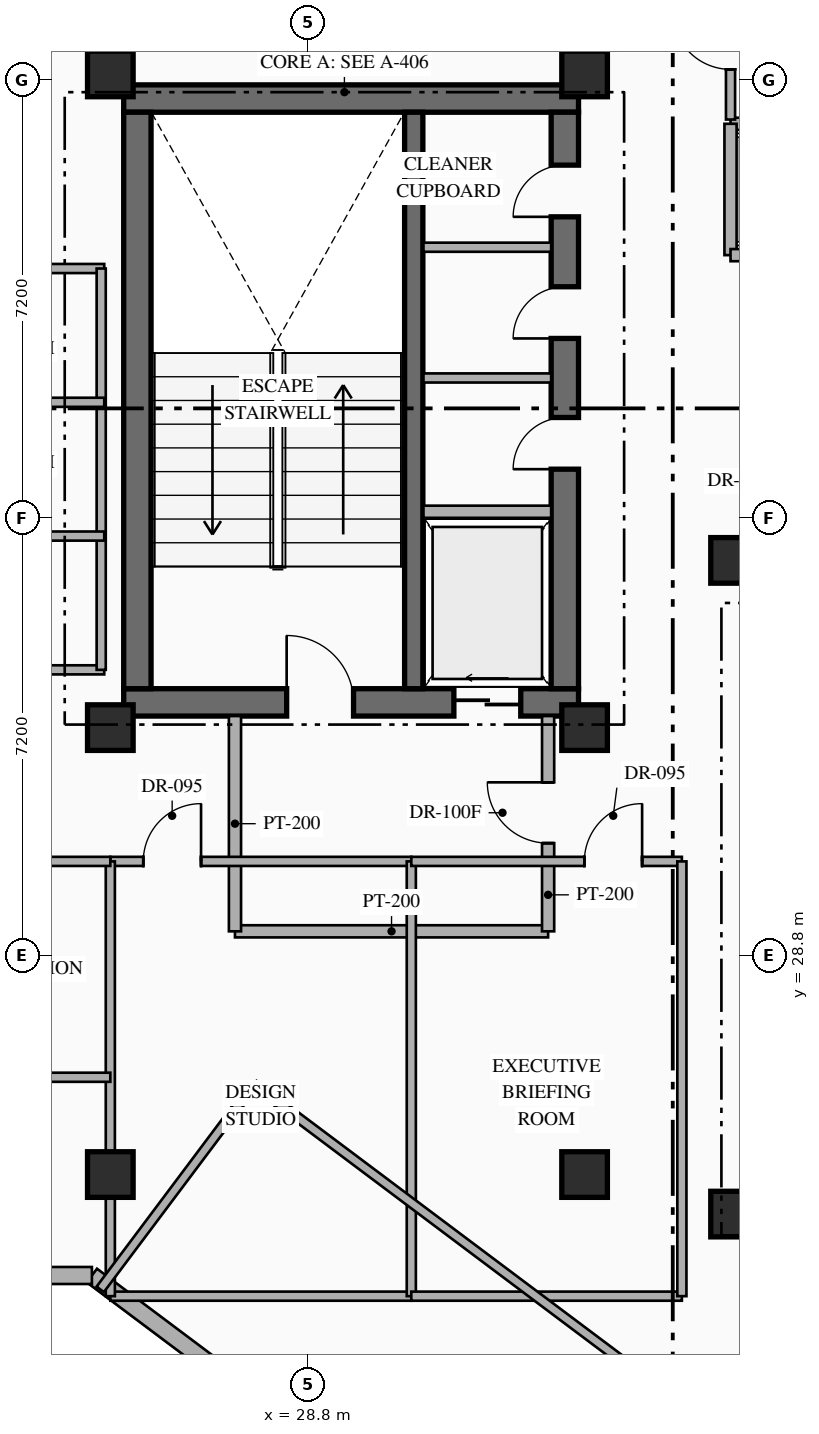
"""IFC4 building model, lengths in metres.
Left out: names, types, materials, properties, quantities, classifications, styles, units other than length and angle.
Written with IfcOpenShell. Run it as: python <this file> out.ifc"""

import sys

from ifc_helpers import new_model, si_unit, direction, frame, frame_2d, origin, origin_2d, place, context, subcontext, project, spatial, rectangle, hollow_rectangle, extrude, element, fill, save


model = new_model("IFC4")
c1 = context("Model", 3, precision=1e-05, world=origin(), true_north=direction((0.0, 1.0)))
c2 = subcontext(c1, "Body", "Model", "MODEL_VIEW")
j1 = project(units=[si_unit("LENGTHUNIT", "METRE"), si_unit("PLANEANGLEUNIT", "RADIAN")], contexts=[c1])
p1 = place(None, origin())
s1 = spatial("IfcSite", under=j1, at=p1, CompositionType="ELEMENT")
p2 = place(p1, origin())
s2 = spatial("IfcBuilding", under=s1, at=p2, CompositionType="ELEMENT")
p3 = place(p2, frame((0.0, 0.0, 195.15)))
s3 = spatial("IfcBuildingStorey", under=s2, at=p3, CompositionType="ELEMENT", Elevation=195.15)
p4 = place(p3, frame((25.77, 32.965, 0.0), z_axis=(0.0, 0.0, 1.0), x_axis=(1.0, 0.0, 0.0)))
e1 = element("IfcWall", 1, at=p4, inside=s3, PredefinedType="SHEAR", context=c2, shape_type="SweptSolid", body=[
    extrude(rectangle(XDim=7.48, YDim=0.45, at=frame_2d((3.74, 0.0))), origin(), (0.0, 0.0, 1.0), 3.6),
])
p5 = place(p4, frame((2.68, 0.0, 0.0)))
e2 = element("IfcOpeningElement", 2, at=p5, cuts=e1, PredefinedType="OPENING", context=c2, shape_type="SweptSolid", body=[
    extrude(rectangle(XDim=1.1, YDim=2.2, at=frame_2d((0.55, 1.1))), frame((0.0, 0.235, 0.0), z_axis=(0.0, -1.0, 0.0), x_axis=(1.0, 0.0, 0.0)), (0.0, 0.0, 1.0), 0.47),
])
p6 = place(p4, frame((5.43, 0.0, 0.0)))
e3 = element("IfcOpeningElement", 3, at=p6, cuts=e1, PredefinedType="OPENING", context=c2, shape_type="SweptSolid", body=[
    extrude(rectangle(XDim=1.1, YDim=2.15, at=frame_2d((0.55, 1.075))), frame((0.0, 0.235, 0.0), z_axis=(0.0, -1.0, 0.0), x_axis=(1.0, 0.0, 0.0)), (0.0, 0.0, 1.0), 0.47),
])
p7 = place(p3, frame((25.77, 42.895, 0.0), z_axis=(0.0, 0.0, 1.0), x_axis=(1.0, 0.0, 0.0)))
e4 = element("IfcWall", 4, at=p7, inside=s3, PredefinedType="SHEAR", context=c2, shape_type="SweptSolid", body=[
    extrude(rectangle(XDim=7.48, YDim=0.45, at=frame_2d((3.74, 0.0))), origin(), (0.0, 0.0, 1.0), 3.6),
])
p8 = place(p3, frame((25.995, 33.19, 0.0), z_axis=(0.0, 0.0, 1.0), x_axis=(0.0, 1.0, 0.0)))
e5 = element("IfcWall", 5, at=p8, inside=s3, PredefinedType="SHEAR", context=c2, shape_type="SweptSolid", body=[
    extrude(rectangle(XDim=9.48, YDim=0.45, at=frame_2d((4.74, 0.0))), origin(), (0.0, 0.0, 1.0), 3.6),
])
p9 = place(p3, frame((33.025, 33.19, 0.0), z_axis=(0.0, 0.0, 1.0), x_axis=(0.0, 1.0, 0.0)))
e6 = element("IfcWall", 6, at=p9, inside=s3, PredefinedType="SHEAR", context=c2, shape_type="SweptSolid", body=[
    extrude(rectangle(XDim=9.48, YDim=0.45, at=frame_2d((4.74, 0.0))), origin(), (0.0, 0.0, 1.0), 3.6),
])
p10 = place(p9, frame((3.61, 0.0, 0.0)))
e7 = element("IfcOpeningElement", 7, at=p10, cuts=e6, PredefinedType="OPENING", context=c2, shape_type="SweptSolid", body=[
    extrude(rectangle(XDim=0.85, YDim=2.08, at=frame_2d((0.425, 1.04))), frame((0.0, 0.235, 0.0), z_axis=(0.0, -1.0, 0.0), x_axis=(1.0, 0.0, 0.0)), (0.0, 0.0, 1.0), 0.47),
])
p11 = place(p9, frame((5.76, 0.0, 0.0)))
e8 = element("IfcOpeningElement", 8, at=p11, cuts=e6, PredefinedType="OPENING", context=c2, shape_type="SweptSolid", body=[
    extrude(rectangle(XDim=0.85, YDim=2.08, at=frame_2d((0.425, 1.04))), frame((0.0, 0.235, 0.0), z_axis=(0.0, -1.0, 0.0), x_axis=(1.0, 0.0, 0.0)), (0.0, 0.0, 1.0), 0.47),
])
p12 = place(p9, frame((7.76, 0.0, 0.0)))
e9 = element("IfcOpeningElement", 9, at=p12, cuts=e6, PredefinedType="OPENING", context=c2, shape_type="SweptSolid", body=[
    extrude(rectangle(XDim=0.85, YDim=2.08, at=frame_2d((0.425, 1.04))), frame((0.0, 0.235, 0.0), z_axis=(0.0, -1.0, 0.0), x_axis=(1.0, 0.0, 0.0)), (0.0, 0.0, 1.0), 0.47),
])
p13 = place(p3, frame((30.54, 33.19, 0.0), z_axis=(0.0, 0.0, 1.0), x_axis=(0.0, 1.0, 0.0)))
e10 = element("IfcWall", 10, at=p13, inside=s3, PredefinedType="SHEAR", context=c2, shape_type="SweptSolid", body=[
    extrude(rectangle(XDim=9.48, YDim=0.3, at=frame_2d((4.74, 0.0))), origin(), (0.0, 0.0, 1.0), 3.6),
])
for number, where, z_axis, x_axis in (
    (11, (25.55, 32.55, 0.0), (0.0, 0.0, 1.0), (1.0, 0.0, 0.0)),
    (12, (33.35, 32.55, 0.0), (0.0, 0.0, 1.0), (1.0, 0.0, 0.0)),
    (13, (25.55, 43.3, 0.0), (0.0, 0.0, 1.0), (1.0, 0.0, 0.0)),
    (14, (33.35, 43.3, 0.0), (0.0, 0.0, 1.0), (1.0, 0.0, 0.0)),
    (15, (35.8, 24.55, 0.0), (0.0, 0.0, 1.0), (1.0, 0.0, 0.0)),
    (16, (35.8, 35.3, 0.0), (0.0, 0.0, 1.0), (1.0, 0.0, 0.0)),
    (17, (25.55, 25.2, 0.0), (0.0, 0.0, 1.0), (1.0, 0.0, 0.0)),
    (18, (33.35, 25.2, 0.0), (0.0, 0.0, 1.0), (1.0, 0.0, 0.0)),
):
    element("IfcColumn", number, at=place(p3, frame(where, z_axis=z_axis, x_axis=x_axis)), inside=s3, PredefinedType="COLUMN", context=c2, shape_type="SweptSolid", body=[
        extrude(hollow_rectangle(XDim=0.75, YDim=0.75, WallThickness=0.028, at=origin_2d()), origin(), (0.0, 0.0, 1.0), 3.6),
    ])
p14 = place(p3, frame((44.918, 8.787, 0.0), z_axis=(0.0, 0.0, 1.0), x_axis=(-0.800004765927, 0.599993645378, 0.0)))
e19 = element("IfcWall", 19, at=p14, inside=s3, PredefinedType="STANDARD", context=c2, shape_type="SweptSolid", body=[
    extrude(rectangle(XDim=24.588, YDim=0.28, at=frame_2d((12.294, 0.0))), origin(), (0.0, 0.0, 1.0), 3.35),
])
p15 = place(p3, frame((25.247, 23.54, 0.0), z_axis=(0.0, 0.0, 1.0), x_axis=(-1.0, 0.0, 0.0)))
e20 = element("IfcWall", 20, at=p15, inside=s3, PredefinedType="STANDARD", context=c2, shape_type="SweptSolid", body=[
    extrude(rectangle(XDim=4.789, YDim=0.28, at=frame_2d((2.395, 0.0))), origin(), (0.0, 0.0, 1.0), 3.35),
])
p16 = place(p3, frame((30.7, 36.1, 0.0), z_axis=(0.0, 0.0, 1.0), x_axis=(1.0, 0.0, 0.0)))
e21 = element("IfcWall", 21, at=p16, inside=s3, PredefinedType="STANDARD", context=c2, shape_type="SweptSolid", body=[
    extrude(rectangle(XDim=2.1, YDim=0.2, at=frame_2d((1.05, 0.0))), origin(), (0.0, 0.0, 1.0), 3.35),
])
for number, where, z_axis, x_axis in (
    (22, (30.7, 38.3, 0.0), (0.0, 0.0, 1.0), (1.0, 0.0, 0.0)),
    (23, (30.7, 40.45, 0.0), (0.0, 0.0, 1.0), (1.0, 0.0, 0.0)),
):
    element("IfcWall", number, at=place(p3, frame(where, z_axis=z_axis, x_axis=x_axis)), inside=s3, PredefinedType="PARTITIONING", context=c2, shape_type="SweptSolid", body=[
        extrude(rectangle(XDim=2.1, YDim=0.15, at=frame_2d((1.05, 0.0))), origin(), (0.0, 0.0, 1.0), 3.35),
    ])
p17 = place(p3, frame((27.6, 29.2, 0.0), z_axis=(0.0, 0.0, 1.0), x_axis=(1.0, 0.0, 0.0)))
e24 = element("IfcWall", 24, at=p17, inside=s3, PredefinedType="STANDARD", context=c2, shape_type="SweptSolid", body=[
    extrude(rectangle(XDim=5.15, YDim=0.2, at=frame_2d((2.575, 0.0))), origin(), (0.0, 0.0, 1.0), 3.35),
])
p18 = place(p3, frame((27.6, 29.2, 0.0), z_axis=(0.0, 0.0, 1.0), x_axis=(0.0, 1.0, 0.0)))
e25 = element("IfcWall", 25, at=p18, inside=s3, PredefinedType="STANDARD", context=c2, shape_type="SweptSolid", body=[
    extrude(rectangle(XDim=3.54, YDim=0.2, at=frame_2d((1.77, 0.0))), origin(), (0.0, 0.0, 1.0), 3.35),
])
p19 = place(p3, frame((32.75, 29.2, 0.0), z_axis=(0.0, 0.0, 1.0), x_axis=(0.0, 1.0, 0.0)))
e26 = element("IfcWall", 26, at=p19, inside=s3, PredefinedType="STANDARD", context=c2, shape_type="SweptSolid", body=[
    extrude(rectangle(XDim=3.54, YDim=0.2, at=frame_2d((1.77, 0.0))), origin(), (0.0, 0.0, 1.0), 3.35),
])
p20 = place(p19, frame((1.45, 0.0, 0.0)))
e27 = element("IfcOpeningElement", 27, at=p20, cuts=e26, PredefinedType="OPENING", context=c2, shape_type="SweptSolid", body=[
    extrude(rectangle(XDim=1.0, YDim=2.2, at=frame_2d((0.5, 1.1))), frame((0.0, 0.11, 0.0), z_axis=(0.0, -1.0, 0.0), x_axis=(1.0, 0.0, 0.0)), (0.0, 0.0, 1.0), 0.22),
])
p21 = place(p3, frame((35.75, 42.48, 0.0), z_axis=(0.0, 0.0, 1.0), x_axis=(1.0, 0.0, 0.0)))
e28 = element("IfcWall", 28, at=p21, inside=s3, PredefinedType="STANDARD", context=c2, shape_type="SweptSolid", body=[
    extrude(rectangle(XDim=9.11, YDim=0.2, at=frame_2d((4.555, 0.0))), origin(), (0.0, 0.0, 1.0), 3.35),
])
p22 = place(p3, frame((35.75, 40.32, 0.0), z_axis=(0.0, 0.0, 1.0), x_axis=(0.0, 1.0, 0.0)))
e29 = element("IfcWall", 29, at=p22, inside=s3, PredefinedType="STANDARD", context=c2, shape_type="SweptSolid", body=[
    extrude(rectangle(XDim=2.16, YDim=0.2, at=frame_2d((1.08, 0.0))), origin(), (0.0, 0.0, 1.0), 3.35),
])
p23 = place(p3, frame((35.75, 40.32, 0.0), z_axis=(0.0, 0.0, 1.0), x_axis=(1.0, 0.0, 0.0)))
e30 = element("IfcWall", 30, at=p23, inside=s3, PredefinedType="STANDARD", context=c2, shape_type="SweptSolid", body=[
    extrude(rectangle(XDim=9.11, YDim=0.2, at=frame_2d((4.555, 0.0))), origin(), (0.0, 0.0, 1.0), 3.35),
])
p24 = place(p23, frame((0.53, 0.0, 0.0)))
e31 = element("IfcOpeningElement", 31, at=p24, cuts=e30, PredefinedType="OPENING", context=c2, shape_type="SweptSolid", body=[
    extrude(rectangle(XDim=1.1, YDim=2.18, at=frame_2d((0.55, 1.09))), frame((0.0, 0.11, 0.0), z_axis=(0.0, -1.0, 0.0), x_axis=(1.0, 0.0, 0.0)), (0.0, 0.0, 1.0), 0.22),
])
p25 = place(p23, frame((2.73, 0.0, 0.0)))
e32 = element("IfcOpeningElement", 32, at=p25, cuts=e30, PredefinedType="OPENING", context=c2, shape_type="SweptSolid", body=[
    extrude(rectangle(XDim=1.1, YDim=2.18, at=frame_2d((0.55, 1.09))), frame((0.0, 0.11, 0.0), z_axis=(0.0, -1.0, 0.0), x_axis=(1.0, 0.0, 0.0)), (0.0, 0.0, 1.0), 0.22),
])
p26 = place(p23, frame((4.93, 0.0, 0.0)))
e33 = element("IfcOpeningElement", 33, at=p26, cuts=e30, PredefinedType="OPENING", context=c2, shape_type="SweptSolid", body=[
    extrude(rectangle(XDim=1.1, YDim=2.18, at=frame_2d((0.55, 1.09))), frame((0.0, 0.11, 0.0), z_axis=(0.0, -1.0, 0.0), x_axis=(1.0, 0.0, 0.0)), (0.0, 0.0, 1.0), 0.22),
])
p27 = place(p23, frame((7.13, 0.0, 0.0)))
e34 = element("IfcOpeningElement", 34, at=p27, cuts=e30, PredefinedType="OPENING", context=c2, shape_type="SweptSolid", body=[
    extrude(rectangle(XDim=1.1, YDim=2.18, at=frame_2d((0.55, 1.09))), frame((0.0, 0.11, 0.0), z_axis=(0.0, -1.0, 0.0), x_axis=(1.0, 0.0, 0.0)), (0.0, 0.0, 1.0), 0.22),
])
for number, where, z_axis, x_axis in (
    (35, (22.15, 33.5, 0.0), (0.0, 0.0, 1.0), (1.0, 0.0, 0.0)),
    (36, (22.15, 40.1, 0.0), (0.0, 0.0, 1.0), (1.0, 0.0, 0.0)),
):
    element("IfcWall", number, at=place(p3, frame(where, z_axis=z_axis, x_axis=x_axis)), inside=s3, PredefinedType="PARTITIONING", context=c2, shape_type="SweptSolid", body=[
        extrude(rectangle(XDim=3.3, YDim=0.15, at=frame_2d((1.65, 0.0))), origin(), (0.0, 0.0, 1.0), 3.35),
    ])
p28 = place(p3, frame((25.4, 33.5, 0.0), z_axis=(0.0, 0.0, 1.0), x_axis=(0.0, 1.0, 0.0)))
e37 = element("IfcWall", 37, at=p28, inside=s3, PredefinedType="PARTITIONING", context=c2, shape_type="SweptSolid", body=[
    extrude(rectangle(XDim=6.6, YDim=0.15, at=frame_2d((3.3, 0.0))), origin(), (0.0, 0.0, 1.0), 3.35),
])
for number, where, z_axis, x_axis in (
    (38, (22.15, 35.7, 0.0), (0.0, 0.0, 1.0), (1.0, 0.0, 0.0)),
    (39, (22.15, 37.9, 0.0), (0.0, 0.0, 1.0), (1.0, 0.0, 0.0)),
):
    element("IfcWall", number, at=place(p3, frame(where, z_axis=z_axis, x_axis=x_axis)), inside=s3, PredefinedType="PARTITIONING", context=c2, shape_type="SweptSolid", body=[
        extrude(rectangle(XDim=3.3, YDim=0.15, at=frame_2d((1.65, 0.0))), origin(), (0.0, 0.0, 1.0), 3.35),
    ])
p29 = place(p3, frame((25.55, 23.2, 0.0), z_axis=(0.0, 0.0, 1.0), x_axis=(1.0, 0.0, 0.0)))
e40 = element("IfcWall", 40, at=p29, inside=s3, PredefinedType="PARTITIONING", context=c2, shape_type="SweptSolid", body=[
    extrude(rectangle(XDim=4.95, YDim=0.15, at=frame_2d((2.475, 0.0))), origin(), (0.0, 0.0, 1.0), 3.35),
])
p30 = place(p3, frame((25.55, 30.35, 0.0), z_axis=(0.0, 0.0, 1.0), x_axis=(1.0, 0.0, 0.0)))
e41 = element("IfcWall", 41, at=p30, inside=s3, PredefinedType="PARTITIONING", context=c2, shape_type="SweptSolid", body=[
    extrude(rectangle(XDim=4.95, YDim=0.15, at=frame_2d((2.475, 0.0))), origin(), (0.0, 0.0, 1.0), 3.35),
])
p31 = place(p30, frame((0.542, 0.0, 0.0)))
e42 = element("IfcOpeningElement", 42, at=p31, cuts=e41, PredefinedType="OPENING", context=c2, shape_type="SweptSolid", body=[
    extrude(rectangle(XDim=0.95, YDim=2.15, at=frame_2d((0.475, 1.075))), frame((0.0, 0.085, 0.0), z_axis=(0.0, -1.0, 0.0), x_axis=(1.0, 0.0, 0.0)), (0.0, 0.0, 1.0), 0.17),
])
p32 = place(p3, frame((25.55, 23.2, 0.0), z_axis=(0.0, 0.0, 1.0), x_axis=(0.0, 1.0, 0.0)))
e43 = element("IfcWall", 43, at=p32, inside=s3, PredefinedType="PARTITIONING", context=c2, shape_type="SweptSolid", body=[
    extrude(rectangle(XDim=7.15, YDim=0.15, at=frame_2d((3.575, 0.0))), origin(), (0.0, 0.0, 1.0), 2.757),
])
p33 = place(p3, frame((30.5, 23.2, 0.0), z_axis=(0.0, 0.0, 1.0), x_axis=(0.0, 1.0, 0.0)))
e44 = element("IfcWall", 44, at=p33, inside=s3, PredefinedType="PARTITIONING", context=c2, shape_type="SweptSolid", body=[
    extrude(rectangle(XDim=7.15, YDim=0.15, at=frame_2d((3.575, 0.0))), origin(), (0.0, 0.0, 1.0), 3.35),
])
p34 = place(p3, frame((30.5, 23.2, 0.0), z_axis=(0.0, 0.0, 1.0), x_axis=(1.0, 0.0, 0.0)))
e45 = element("IfcWall", 45, at=p34, inside=s3, PredefinedType="PARTITIONING", context=c2, shape_type="SweptSolid", body=[
    extrude(rectangle(XDim=4.45, YDim=0.15, at=frame_2d((2.225, 0.0))), origin(), (0.0, 0.0, 1.0), 3.35),
])
p35 = place(p3, frame((30.5, 30.35, 0.0), z_axis=(0.0, 0.0, 1.0), x_axis=(1.0, 0.0, 0.0)))
e46 = element("IfcWall", 46, at=p35, inside=s3, PredefinedType="PARTITIONING", context=c2, shape_type="SweptSolid", body=[
    extrude(rectangle(XDim=4.45, YDim=0.15, at=frame_2d((2.225, 0.0))), origin(), (0.0, 0.0, 1.0), 3.35),
])
p36 = place(p35, frame((2.846, 0.0, 0.0)))
e47 = element("IfcOpeningElement", 47, at=p36, cuts=e46, PredefinedType="OPENING", context=c2, shape_type="SweptSolid", body=[
    extrude(rectangle(XDim=0.95, YDim=2.15, at=frame_2d((0.475, 1.075))), frame((0.0, 0.085, 0.0), z_axis=(0.0, -1.0, 0.0), x_axis=(1.0, 0.0, 0.0)), (0.0, 0.0, 1.0), 0.17),
])
p37 = place(p3, frame((34.95, 23.2, 0.0), z_axis=(0.0, 0.0, 1.0), x_axis=(0.0, 1.0, 0.0)))
e48 = element("IfcWall", 48, at=p37, inside=s3, PredefinedType="PARTITIONING", context=c2, shape_type="SweptSolid", body=[
    extrude(rectangle(XDim=7.15, YDim=0.15, at=frame_2d((3.575, 0.0))), origin(), (0.0, 0.0, 1.0), 3.35),
])
p38 = place(p3, frame((22.25, 26.8, 0.0), z_axis=(0.0, 0.0, 1.0), x_axis=(1.0, 0.0, 0.0)))
e49 = element("IfcWall", 49, at=p38, inside=s3, PredefinedType="PARTITIONING", context=c2, shape_type="SweptSolid", body=[
    extrude(rectangle(XDim=3.3, YDim=0.15, at=frame_2d((1.65, 0.0))), origin(), (0.0, 0.0, 1.0), 3.35),
])
p39 = place(p3, frame((22.25, 30.35, 0.0), z_axis=(0.0, 0.0, 1.0), x_axis=(1.0, 0.0, 0.0)))
e50 = element("IfcWall", 50, at=p39, inside=s3, PredefinedType="PARTITIONING", context=c2, shape_type="SweptSolid", body=[
    extrude(rectangle(XDim=3.3, YDim=0.15, at=frame_2d((1.65, 0.0))), origin(), (0.0, 0.0, 1.0), 3.35),
])
p40 = place(p39, frame((1.2, 0.0, 0.0)))
e51 = element("IfcOpeningElement", 51, at=p40, cuts=e50, PredefinedType="OPENING", context=c2, shape_type="SweptSolid", body=[
    extrude(rectangle(XDim=0.9, YDim=2.15, at=frame_2d((0.45, 1.075))), frame((0.0, 0.085, 0.0), z_axis=(0.0, -1.0, 0.0), x_axis=(1.0, 0.0, 0.0)), (0.0, 0.0, 1.0), 0.17),
])
p41 = place(p3, frame((35.75, 42.55, 0.0), z_axis=(0.0, 0.0, 1.0), x_axis=(0.0, 1.0, 0.0)))
e52 = element("IfcWall", 52, at=p41, inside=s3, PredefinedType="PARTITIONING", context=c2, shape_type="SweptSolid", body=[
    extrude(rectangle(XDim=2.6, YDim=0.15, at=frame_2d((1.3, 0.0))), origin(), (0.0, 0.0, 1.0), 3.35),
])
p42 = place(p41, frame((0.825, 0.0, 0.0)))
e53 = element("IfcOpeningElement", 53, at=p42, cuts=e52, PredefinedType="OPENING", context=c2, shape_type="SweptSolid", body=[
    extrude(rectangle(XDim=0.95, YDim=2.15, at=frame_2d((0.475, 1.075))), frame((0.0, 0.085, 0.0), z_axis=(0.0, -1.0, 0.0), x_axis=(1.0, 0.0, 0.0)), (0.0, 0.0, 1.0), 0.17),
])
p43 = place(p3, frame((27.91, 26.68, 0.0), z_axis=(0.0, 0.0, 1.0), x_axis=(0.800005938517, -0.599992081896, 0.0)))
e54 = element("IfcWall", 54, at=p43, inside=s3, PredefinedType="PARTITIONING", context=c2, shape_type="SweptSolid", body=[
    extrude(rectangle(XDim=14.8, YDim=0.15, at=frame_2d((7.4, 0.0))), origin(), (0.0, 0.0, 1.0), 3.35),
])
p44 = place(p43, frame((9.281, 0.0, 0.0)))
e55 = element("IfcOpeningElement", 55, at=p44, cuts=e54, PredefinedType="OPENING", context=c2, shape_type="SweptSolid", body=[
    extrude(rectangle(XDim=0.95, YDim=2.15, at=frame_2d((0.475, 1.075))), frame((0.0, 0.085, 0.0), z_axis=(0.0, -1.0, 0.0), x_axis=(1.0, 0.0, 0.0)), (0.0, 0.0, 1.0), 0.17),
])
p45 = place(p3, frame((25.384, 23.312, 0.0), z_axis=(0.0, 0.0, 1.0), x_axis=(0.599990721155, 0.80000695905, 0.0)))
e56 = element("IfcWall", 56, at=p45, inside=s3, PredefinedType="PARTITIONING", context=c2, shape_type="SweptSolid", body=[
    extrude(rectangle(XDim=4.21, YDim=0.15, at=frame_2d((2.105, 0.0))), origin(), (0.0, 0.0, 1.0), 3.35),
])
p46 = place(p5, origin())
e57 = element("IfcDoor", 57, at=p46, inside=s3, OperationType="SINGLE_SWING_LEFT", PredefinedType="DOOR", context=c2, shape_type="SweptSolid", body=[
    extrude(rectangle(XDim=1.1, YDim=2.2, at=frame_2d((0.55, 1.1))), frame((0.0, 0.025, 0.0), z_axis=(0.0, -1.0, 0.0), x_axis=(1.0, 0.0, 0.0)), (0.0, 0.0, 1.0), 0.05),
])
fill(e2, e57)
p47 = place(p6, origin())
e58 = element("IfcDoor", 58, at=p47, inside=s3, OperationType="SLIDING_TO_LEFT", PredefinedType="USERDEFINED", context=c2, shape_type="SweptSolid", body=[
    extrude(rectangle(XDim=1.1, YDim=2.15, at=frame_2d((0.55, 1.075))), frame((0.0, 0.025, 0.0), z_axis=(0.0, -1.0, 0.0), x_axis=(1.0, 0.0, 0.0)), (0.0, 0.0, 1.0), 0.05),
])
fill(e3, e58)
p48 = place(p10, origin())
e59 = element("IfcDoor", 59, at=p48, inside=s3, OperationType="SINGLE_SWING_LEFT", PredefinedType="DOOR", context=c2, shape_type="SweptSolid", body=[
    extrude(rectangle(XDim=0.85, YDim=2.08, at=frame_2d((0.425, 1.04))), frame((0.0, 0.025, 0.0), z_axis=(0.0, -1.0, 0.0), x_axis=(1.0, 0.0, 0.0)), (0.0, 0.0, 1.0), 0.05),
])
fill(e7, e59)
p49 = place(p11, origin())
e60 = element("IfcDoor", 60, at=p49, inside=s3, OperationType="SINGLE_SWING_LEFT", PredefinedType="DOOR", context=c2, shape_type="SweptSolid", body=[
    extrude(rectangle(XDim=0.85, YDim=2.08, at=frame_2d((0.425, 1.04))), frame((0.0, 0.025, 0.0), z_axis=(0.0, -1.0, 0.0), x_axis=(1.0, 0.0, 0.0)), (0.0, 0.0, 1.0), 0.05),
])
fill(e8, e60)
p50 = place(p12, origin())
e61 = element("IfcDoor", 61, at=p50, inside=s3, OperationType="SINGLE_SWING_LEFT", PredefinedType="DOOR", context=c2, shape_type="SweptSolid", body=[
    extrude(rectangle(XDim=0.85, YDim=2.08, at=frame_2d((0.425, 1.04))), frame((0.0, 0.025, 0.0), z_axis=(0.0, -1.0, 0.0), x_axis=(1.0, 0.0, 0.0)), (0.0, 0.0, 1.0), 0.05),
])
fill(e9, e61)
p51 = place(p20, origin())
e62 = element("IfcDoor", 62, at=p51, inside=s3, OperationType="SINGLE_SWING_RIGHT", PredefinedType="DOOR", context=c2, shape_type="SweptSolid", body=[
    extrude(rectangle(XDim=1.0, YDim=2.2, at=frame_2d((0.5, 1.1))), frame((0.0, 0.025, 0.0), z_axis=(0.0, -1.0, 0.0), x_axis=(1.0, 0.0, 0.0)), (0.0, 0.0, 1.0), 0.05),
])
fill(e27, e62)
p52 = place(p31, origin())
e63 = element("IfcDoor", 63, at=p52, inside=s3, OperationType="SINGLE_SWING_RIGHT", PredefinedType="DOOR", context=c2, shape_type="SweptSolid", body=[
    extrude(rectangle(XDim=0.95, YDim=2.15, at=frame_2d((0.475, 1.075))), frame((0.0, 0.025, 0.0), z_axis=(0.0, -1.0, 0.0), x_axis=(1.0, 0.0, 0.0)), (0.0, 0.0, 1.0), 0.05),
])
fill(e42, e63)
p53 = place(p36, origin())
e64 = element("IfcDoor", 64, at=p53, inside=s3, OperationType="SINGLE_SWING_RIGHT", PredefinedType="DOOR", context=c2, shape_type="SweptSolid", body=[
    extrude(rectangle(XDim=0.95, YDim=2.15, at=frame_2d((0.475, 1.075))), frame((0.0, 0.025, 0.0), z_axis=(0.0, -1.0, 0.0), x_axis=(1.0, 0.0, 0.0)), (0.0, 0.0, 1.0), 0.05),
])
fill(e47, e64)
p54 = place(p42, origin())
e65 = element("IfcDoor", 65, at=p54, inside=s3, OperationType="SINGLE_SWING_RIGHT", PredefinedType="DOOR", context=c2, shape_type="SweptSolid", body=[
    extrude(rectangle(XDim=0.95, YDim=2.15, at=frame_2d((0.475, 1.075))), frame((0.0, 0.025, 0.0), z_axis=(0.0, -1.0, 0.0), x_axis=(1.0, 0.0, 0.0)), (0.0, 0.0, 1.0), 0.05),
])
fill(e53, e65)
save(model, sys.argv[1])
